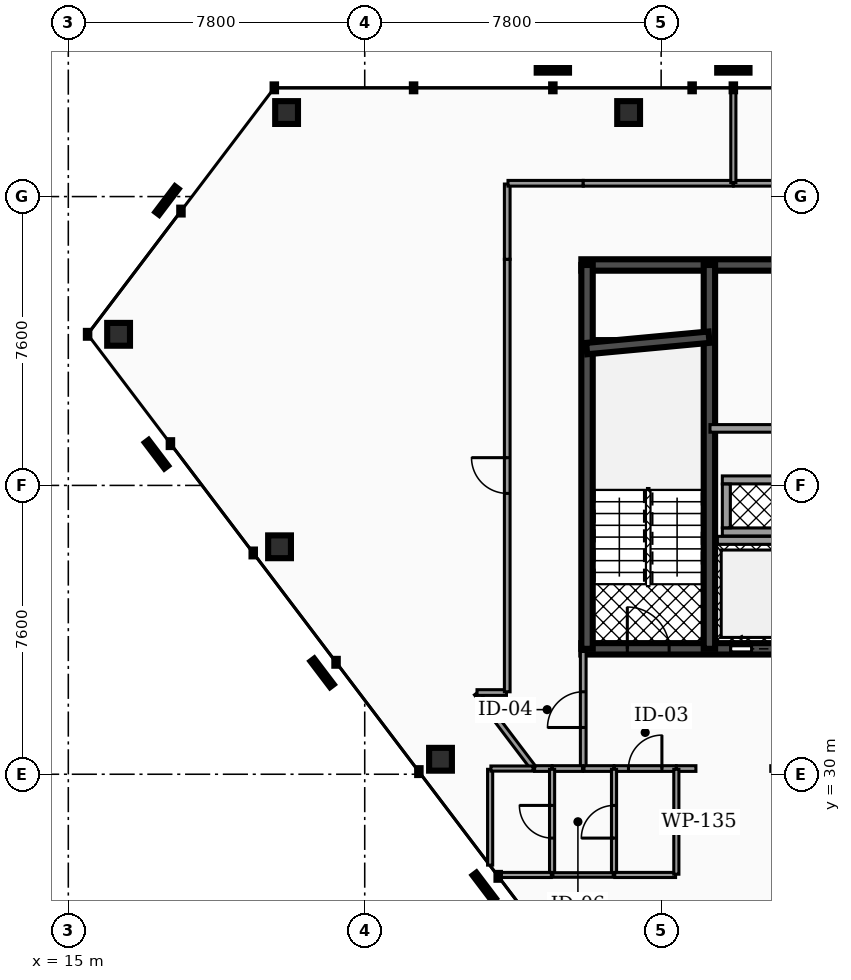
"""IFC4 building model, lengths in metres.
Left out: names, types, materials, properties, quantities, classifications, styles, units other than length and angle.
Written with IfcOpenShell. Run it as: python <this file> out.ifc"""

import sys

from ifc_helpers import new_model, si_unit, direction, frame, frame_2d, origin, origin_2d, place, context, subcontext, project, spatial, rectangle, hollow_rectangle, extrude, element, fill, save


model = new_model("IFC4")
c1 = context("Model", 3, precision=1e-05, world=origin(), true_north=direction((0.0, 1.0)))
c2 = subcontext(c1, "Body", "Model", "MODEL_VIEW")
j1 = project(units=[si_unit("LENGTHUNIT", "METRE"), si_unit("PLANEANGLEUNIT", "RADIAN")], contexts=[c1])
p1 = place(None, origin())
s1 = spatial("IfcSite", under=j1, at=p1, CompositionType="ELEMENT")
p2 = place(p1, origin())
s2 = spatial("IfcBuilding", under=s1, at=p2, CompositionType="ELEMENT")
p3 = place(p2, frame((0.0, 0.0, 239.36)))
s3 = spatial("IfcBuildingStorey", under=s2, at=p3, CompositionType="ELEMENT", Elevation=239.36)
p4 = place(p3, frame((28.5, 43.4, 0.0), z_axis=(0.0, 0.0, 1.0), x_axis=(1.0, 0.0, 0.0)))
e1 = element("IfcWall", 1, at=p4, inside=s3, PredefinedType="SHEAR", context=c2, shape_type="SweptSolid", body=[
    extrude(rectangle(XDim=19.86, YDim=0.3, at=frame_2d((9.93, 0.0))), origin(), (0.0, 0.0, 1.0), 3.18),
])
p5 = place(p3, frame((28.5, 33.3, 0.0), z_axis=(0.0, 0.0, 1.0), x_axis=(1.0, 0.0, 0.0)))
e2 = element("IfcWall", 2, at=p5, inside=s3, PredefinedType="SHEAR", context=c2, shape_type="SweptSolid", body=[
    extrude(rectangle(XDim=19.86, YDim=0.3, at=frame_2d((9.93, 0.0))), origin(), (0.0, 0.0, 1.0), 3.18),
])
p6 = place(p5, frame((3.93, 0.0, 0.0)))
e3 = element("IfcOpeningElement", 3, at=p6, cuts=e2, PredefinedType="OPENING", context=c2, shape_type="SweptSolid", body=[
    extrude(rectangle(XDim=1.1, YDim=2.15, at=frame_2d((0.55, 1.075))), frame((0.0, 0.16, 0.0), z_axis=(0.0, -1.0, 0.0), x_axis=(1.0, 0.0, 0.0)), (0.0, 0.0, 1.0), 0.32),
])
p7 = place(p5, frame((14.77, 0.0, 0.0)))
e4 = element("IfcOpeningElement", 4, at=p7, cuts=e2, PredefinedType="OPENING", context=c2, shape_type="SweptSolid", body=[
    extrude(rectangle(XDim=1.1, YDim=2.15, at=frame_2d((0.55, 1.075))), frame((0.0, 0.16, 0.0), z_axis=(0.0, -1.0, 0.0), x_axis=(1.0, 0.0, 0.0)), (0.0, 0.0, 1.0), 0.32),
])
p8 = place(p5, frame((11.25, 0.0, 0.0)))
e5 = element("IfcOpeningElement", 5, at=p8, cuts=e2, PredefinedType="OPENING", context=c2, shape_type="SweptSolid", body=[
    extrude(rectangle(XDim=1.0, YDim=2.1, at=frame_2d((0.5, 1.05))), frame((0.0, 0.16, 0.0), z_axis=(0.0, -1.0, 0.0), x_axis=(1.0, 0.0, 0.0)), (0.0, 0.0, 1.0), 0.32),
])
p9 = place(p5, frame((12.95, 0.0, 0.0)))
e6 = element("IfcOpeningElement", 6, at=p9, cuts=e2, PredefinedType="OPENING", context=c2, shape_type="SweptSolid", body=[
    extrude(rectangle(XDim=1.0, YDim=2.1, at=frame_2d((0.5, 1.05))), frame((0.0, 0.16, 0.0), z_axis=(0.0, -1.0, 0.0), x_axis=(1.0, 0.0, 0.0)), (0.0, 0.0, 1.0), 0.32),
])
p10 = place(p5, frame((5.85, 0.0, 0.0)))
e7 = element("IfcOpeningElement", 7, at=p10, cuts=e2, PredefinedType="OPENING", context=c2, shape_type="SweptSolid", body=[
    extrude(rectangle(XDim=1.0, YDim=2.1, at=frame_2d((0.5, 1.05))), frame((0.0, 0.16, 0.0), z_axis=(0.0, -1.0, 0.0), x_axis=(1.0, 0.0, 0.0)), (0.0, 0.0, 1.0), 0.32),
])
p11 = place(p5, frame((1.21, 0.0, 0.0)))
e8 = element("IfcOpeningElement", 8, at=p11, cuts=e2, PredefinedType="OPENING", context=c2, shape_type="SweptSolid", body=[
    extrude(rectangle(XDim=1.1, YDim=2.2, at=frame_2d((0.55, 1.1))), frame((0.0, 0.16, 0.0), z_axis=(0.0, -1.0, 0.0), x_axis=(1.0, 0.0, 0.0)), (0.0, 0.0, 1.0), 0.32),
])
p12 = place(p5, frame((9.34, 0.0, 0.0)))
e9 = element("IfcOpeningElement", 9, at=p12, cuts=e2, PredefinedType="OPENING", context=c2, shape_type="SweptSolid", body=[
    extrude(rectangle(XDim=1.12, YDim=2.05, at=frame_2d((0.56, 1.025))), frame((0.0, 0.16, 0.0), z_axis=(0.0, -1.0, 0.0), x_axis=(1.0, 0.0, 0.0)), (0.0, 0.0, 1.0), 0.32),
])
p13 = place(p5, frame((17.55, 0.0, 0.0)))
e10 = element("IfcOpeningElement", 10, at=p13, cuts=e2, PredefinedType="OPENING", context=c2, shape_type="SweptSolid", body=[
    extrude(rectangle(XDim=1.1, YDim=2.2, at=frame_2d((0.55, 1.1))), frame((0.0, 0.16, 0.0), z_axis=(0.0, -1.0, 0.0), x_axis=(1.0, 0.0, 0.0)), (0.0, 0.0, 1.0), 0.32),
])
for number, where, z_axis, x_axis in (
    (11, (28.65, 33.3, 0.0), (0.0, 0.0, 1.0), (0.0, 1.0, 0.0)),
    (12, (31.87, 33.3, 0.0), (0.0, 0.0, 1.0), (0.0, 1.0, 0.0)),
):
    element("IfcWall", number, at=place(p3, frame(where, z_axis=z_axis, x_axis=x_axis)), inside=s3, PredefinedType="SHEAR", context=c2, shape_type="SweptSolid", body=[
        extrude(rectangle(XDim=10.1, YDim=0.3, at=frame_2d((5.05, 0.0))), origin(), (0.0, 0.0, 1.0), 3.18),
    ])
p14 = place(p3, frame((28.64, 41.2, 0.0), z_axis=(0.0, 0.0, 1.0), x_axis=(0.995687118776, 0.092774789157, 0.0)))
e13 = element("IfcWall", 13, at=p14, inside=s3, PredefinedType="SHEAR", context=c2, shape_type="SweptSolid", body=[
    extrude(rectangle(XDim=3.234, YDim=0.3, at=frame_2d((1.617, 0.0))), origin(), (0.0, 0.0, 1.0), 3.18),
])
for number, where, z_axis, x_axis in (
    (14, (29.744, 47.411, 0.0), (0.0, 0.0, 1.0), (1.0, 0.0, 0.0)),
    (15, (20.744, 47.411, 0.0), (0.0, 0.0, 1.0), (1.0, 0.0, 0.0)),
    (16, (16.323, 41.576, 0.0), (0.0, 0.0, 1.0), (1.0, 0.0, 0.0)),
    (17, (20.559, 35.985, 0.0), (0.0, 0.0, 1.0), (1.0, 0.0, 0.0)),
    (18, (24.794, 30.394, 0.0), (0.0, 0.0, 1.0), (1.0, 0.0, 0.0)),
):
    element("IfcColumn", number, at=place(p3, frame(where, z_axis=z_axis, x_axis=x_axis)), inside=s3, PredefinedType="COLUMN", context=c2, shape_type="SweptSolid", body=[
        extrude(hollow_rectangle(XDim=0.6, YDim=0.6, WallThickness=0.03, at=origin_2d()), origin(), (0.0, 0.0, 1.0), 3.18),
    ])
p15 = place(p3, frame((32.08, 36.155, 0.0), z_axis=(0.0, 0.0, 1.0), x_axis=(1.0, 0.0, 0.0)))
e19 = element("IfcWall", 19, at=p15, inside=s3, PredefinedType="SOLIDWALL", context=c2, shape_type="SweptSolid", body=[
    extrude(rectangle(XDim=1.8, YDim=0.21, at=frame_2d((0.9, 0.0))), origin(), (0.0, 0.0, 1.0), 3.18),
])
for number, where, z_axis, x_axis in (
    (20, (32.21, 36.375, 0.0), (0.0, 0.0, 1.0), (1.0, 0.0, 0.0)),
    (21, (32.21, 37.745, 0.0), (0.0, 0.0, 1.0), (1.0, 0.0, 0.0)),
):
    element("IfcWall", number, at=place(p3, frame(where, z_axis=z_axis, x_axis=x_axis)), inside=s3, PredefinedType="SOLIDWALL", context=c2, shape_type="SweptSolid", body=[
        extrude(rectangle(XDim=1.6, YDim=0.21, at=frame_2d((0.8, 0.0))), origin(), (0.0, 0.0, 1.0), 3.18),
    ])
p16 = place(p3, frame((32.315, 36.485, 0.0), z_axis=(0.0, 0.0, 1.0), x_axis=(0.0, 1.0, 0.0)))
e22 = element("IfcWall", 22, at=p16, inside=s3, PredefinedType="SOLIDWALL", context=c2, shape_type="SweptSolid", body=[
    extrude(rectangle(XDim=1.15, YDim=0.21, at=frame_2d((0.575, 0.0))), origin(), (0.0, 0.0, 1.0), 3.18),
])
p17 = place(p3, frame((31.885, 39.1, 0.0), z_axis=(0.0, 0.0, 1.0), x_axis=(1.0, 0.0, 0.0)))
e23 = element("IfcWall", 23, at=p17, inside=s3, PredefinedType="PARTITIONING", context=c2, shape_type="SweptSolid", body=[
    extrude(rectangle(XDim=5.645, YDim=0.2, at=frame_2d((2.823, 0.0))), origin(), (0.0, 0.0, 1.0), 2.235),
])
p18 = place(p3, frame((28.55, 30.17, 0.0), z_axis=(0.0, 0.0, 1.0), x_axis=(0.0, 1.0, 0.0)))
e24 = element("IfcWall", 24, at=p18, inside=s3, PredefinedType="PARTITIONING", context=c2, shape_type="SweptSolid", body=[
    extrude(rectangle(XDim=3.06, YDim=0.15, at=frame_2d((1.53, 0.0))), origin(), (0.0, 0.0, 1.0), 2.235),
])
p19 = place(p18, frame((1.06, 0.0, 0.0)))
e25 = element("IfcOpeningElement", 25, at=p19, cuts=e24, PredefinedType="OPENING", context=c2, shape_type="SweptSolid", body=[
    extrude(rectangle(XDim=0.94, YDim=2.05, at=frame_2d((0.47, 1.025))), frame((0.0, 0.085, 0.0), z_axis=(0.0, -1.0, 0.0), x_axis=(1.0, 0.0, 0.0)), (0.0, 0.0, 1.0), 0.17),
])
p20 = place(p3, frame((29.365, 30.15, 0.0), z_axis=(0.0, 0.0, 1.0), x_axis=(1.0, 0.0, 0.0)))
e26 = element("IfcWall", 26, at=p20, inside=s3, PredefinedType="PARTITIONING", context=c2, shape_type="SweptSolid", body=[
    extrude(rectangle(XDim=1.63, YDim=0.15, at=frame_2d((0.815, 0.0))), origin(), (0.0, 0.0, 1.0), 2.235),
])
p21 = place(p20, frame((0.375, 0.0, 0.0)))
e27 = element("IfcOpeningElement", 27, at=p21, cuts=e26, PredefinedType="OPENING", context=c2, shape_type="SweptSolid", body=[
    extrude(rectangle(XDim=0.88, YDim=2.05, at=frame_2d((0.44, 1.025))), frame((0.0, 0.085, 0.0), z_axis=(0.0, -1.0, 0.0), x_axis=(1.0, 0.0, 0.0)), (0.0, 0.0, 1.0), 0.17),
])
p22 = place(p3, frame((28.57, 30.15, 0.0), z_axis=(0.0, 0.0, 1.0), x_axis=(1.0, 0.0, 0.0)))
e28 = element("IfcWall", 28, at=p22, inside=s3, PredefinedType="PARTITIONING", context=c2, shape_type="SweptSolid", body=[
    extrude(rectangle(XDim=0.785, YDim=0.15, at=frame_2d((0.393, 0.0))), origin(), (0.0, 0.0, 1.0), 2.235),
])
p23 = place(p3, frame((33.485, 30.15, 0.0), z_axis=(0.0, 0.0, 1.0), x_axis=(1.0, 0.0, 0.0)))
e29 = element("IfcWall", 29, at=p23, inside=s3, PredefinedType="PARTITIONING", context=c2, shape_type="SweptSolid", body=[
    extrude(rectangle(XDim=9.83, YDim=0.15, at=frame_2d((4.915, 0.0))), origin(), (0.0, 0.0, 1.0), 2.235),
])
p24 = place(p23, frame((0.445, 0.0, 0.0)))
e30 = element("IfcOpeningElement", 30, at=p24, cuts=e29, PredefinedType="OPENING", context=c2, shape_type="SweptSolid", body=[
    extrude(rectangle(XDim=0.94, YDim=2.05, at=frame_2d((0.47, 1.025))), frame((0.0, 0.085, 0.0), z_axis=(0.0, -1.0, 0.0), x_axis=(1.0, 0.0, 0.0)), (0.0, 0.0, 1.0), 0.17),
])
p25 = place(p3, frame((31.005, 30.15, 0.0), z_axis=(0.0, 0.0, 1.0), x_axis=(1.0, 0.0, 0.0)))
e31 = element("IfcWall", 31, at=p25, inside=s3, PredefinedType="PARTITIONING", context=c2, shape_type="SweptSolid", body=[
    extrude(rectangle(XDim=0.51, YDim=0.15, at=frame_2d((0.255, 0.0))), origin(), (0.0, 0.0, 1.0), 2.235),
])
p26 = place(p3, frame((27.27, 30.15, 0.0), z_axis=(0.0, 0.0, 1.0), x_axis=(1.0, 0.0, 0.0)))
e32 = element("IfcWall", 32, at=p26, inside=s3, PredefinedType="PARTITIONING", context=c2, shape_type="SweptSolid", body=[
    extrude(rectangle(XDim=0.455, YDim=0.15, at=frame_2d((0.228, 0.0))), origin(), (0.0, 0.0, 1.0), 2.235),
])
p27 = place(p3, frame((27.735, 30.15, 0.0), z_axis=(0.0, 0.0, 1.0), x_axis=(1.0, 0.0, 0.0)))
e33 = element("IfcWall", 33, at=p27, inside=s3, PredefinedType="PARTITIONING", context=c2, shape_type="SweptSolid", body=[
    extrude(rectangle(XDim=0.795, YDim=0.15, at=frame_2d((0.397, 0.0))), origin(), (0.0, 0.0, 1.0), 2.235),
])
p28 = place(p3, frame((25.747, 32.134, 0.0), z_axis=(0.0, 0.0, 1.0), x_axis=(0.603931928578, -0.797035899847, 0.0)))
e34 = element("IfcWall", 34, at=p28, inside=s3, PredefinedType="PARTITIONING", context=c2, shape_type="SweptSolid", body=[
    extrude(rectangle(XDim=2.469, YDim=0.15, at=frame_2d((1.235, 0.0))), origin(), (0.0, 0.0, 1.0), 2.235),
])
p29 = place(p3, frame((25.755, 32.15, 0.0), z_axis=(0.0, 0.0, 1.0), x_axis=(1.0, 0.0, 0.0)))
e35 = element("IfcWall", 35, at=p29, inside=s3, PredefinedType="PARTITIONING", context=c2, shape_type="SweptSolid", body=[
    extrude(rectangle(XDim=0.775, YDim=0.15, at=frame_2d((0.388, 0.0))), origin(), (0.0, 0.0, 1.0), 2.235),
])
p30 = place(p3, frame((26.55, 32.17, 0.0), z_axis=(0.0, 0.0, 1.0), x_axis=(0.0, 1.0, 0.0)))
e36 = element("IfcWall", 36, at=p30, inside=s3, PredefinedType="PARTITIONING", context=c2, shape_type="SweptSolid", body=[
    extrude(rectangle(XDim=11.38, YDim=0.15, at=frame_2d((5.69, 0.0))), origin(), (0.0, 0.0, 1.0), 2.235),
])
p31 = place(p30, frame((5.22, 0.0, 0.0)))
e37 = element("IfcOpeningElement", 37, at=p31, cuts=e36, PredefinedType="OPENING", context=c2, shape_type="SweptSolid", body=[
    extrude(rectangle(XDim=0.94, YDim=2.05, at=frame_2d((0.47, 1.025))), frame((0.0, 0.085, 0.0), z_axis=(0.0, -1.0, 0.0), x_axis=(1.0, 0.0, 0.0)), (0.0, 0.0, 1.0), 0.17),
])
for number, where, z_axis, x_axis in (
    (38, (26.55, 43.55, 0.0), (0.0, 0.0, 1.0), (0.0, 1.0, 0.0)),
    (39, (26.57, 45.55, 0.0), (0.0, 0.0, 1.0), (1.0, 0.0, 0.0)),
):
    element("IfcWall", number, at=place(p3, frame(where, z_axis=z_axis, x_axis=x_axis)), inside=s3, PredefinedType="PARTITIONING", context=c2, shape_type="SweptSolid", body=[
        extrude(rectangle(XDim=1.98, YDim=0.15, at=frame_2d((0.99, 0.0))), origin(), (0.0, 0.0, 1.0), 2.235),
    ])
p32 = place(p3, frame((28.55, 45.55, 0.0), z_axis=(0.0, 0.0, 1.0), x_axis=(1.0, 0.0, 0.0)))
e40 = element("IfcWall", 40, at=p32, inside=s3, PredefinedType="PARTITIONING", context=c2, shape_type="SweptSolid", body=[
    extrude(rectangle(XDim=3.945, YDim=0.15, at=frame_2d((1.973, 0.0))), origin(), (0.0, 0.0, 1.0), 2.235),
])
p33 = place(p3, frame((32.505, 45.55, 0.0), z_axis=(0.0, 0.0, 1.0), x_axis=(1.0, 0.0, 0.0)))
e41 = element("IfcWall", 41, at=p33, inside=s3, PredefinedType="PARTITIONING", context=c2, shape_type="SweptSolid", body=[
    extrude(rectangle(XDim=2.114, YDim=0.15, at=frame_2d((1.057, 0.0))), origin(), (0.0, 0.0, 1.0), 2.235),
])
p34 = place(p3, frame((29.36, 27.37, 0.0), z_axis=(0.0, 0.0, 1.0), x_axis=(0.0, 1.0, 0.0)))
e42 = element("IfcWall", 42, at=p34, inside=s3, PredefinedType="PARTITIONING", context=c2, shape_type="SweptSolid", body=[
    extrude(rectangle(XDim=2.76, YDim=0.135, at=frame_2d((1.38, 0.0))), origin(), (0.0, 0.0, 1.0), 2.235),
])
p35 = place(p34, frame((0.95, 0.0, 0.0)))
e43 = element("IfcOpeningElement", 43, at=p35, cuts=e42, PredefinedType="OPENING", context=c2, shape_type="SweptSolid", body=[
    extrude(rectangle(XDim=0.86, YDim=2.05, at=frame_2d((0.43, 1.025))), frame((0.0, 0.077, 0.0), z_axis=(0.0, -1.0, 0.0), x_axis=(1.0, 0.0, 0.0)), (0.0, 0.0, 1.0), 0.155),
])
p36 = place(p3, frame((29.38, 27.35, 0.0), z_axis=(0.0, 0.0, 1.0), x_axis=(1.0, 0.0, 0.0)))
e44 = element("IfcWall", 44, at=p36, inside=s3, PredefinedType="PARTITIONING", context=c2, shape_type="SweptSolid", body=[
    extrude(rectangle(XDim=1.6, YDim=0.135, at=frame_2d((0.8, 0.0))), origin(), (0.0, 0.0, 1.0), 2.235),
])
p37 = place(p3, frame((31.0, 27.37, 0.0), z_axis=(0.0, 0.0, 1.0), x_axis=(0.0, 1.0, 0.0)))
e45 = element("IfcWall", 45, at=p37, inside=s3, PredefinedType="PARTITIONING", context=c2, shape_type="SweptSolid", body=[
    extrude(rectangle(XDim=2.76, YDim=0.135, at=frame_2d((1.38, 0.0))), origin(), (0.0, 0.0, 1.0), 2.235),
])
p38 = place(p3, frame((27.73, 27.37, 0.0), z_axis=(0.0, 0.0, 1.0), x_axis=(0.0, 1.0, 0.0)))
e46 = element("IfcWall", 46, at=p38, inside=s3, PredefinedType="PARTITIONING", context=c2, shape_type="SweptSolid", body=[
    extrude(rectangle(XDim=2.76, YDim=0.135, at=frame_2d((1.38, 0.0))), origin(), (0.0, 0.0, 1.0), 2.235),
])
p39 = place(p38, frame((0.95, 0.0, 0.0)))
e47 = element("IfcOpeningElement", 47, at=p39, cuts=e46, PredefinedType="OPENING", context=c2, shape_type="SweptSolid", body=[
    extrude(rectangle(XDim=0.86, YDim=2.05, at=frame_2d((0.43, 1.025))), frame((0.0, 0.077, 0.0), z_axis=(0.0, -1.0, 0.0), x_axis=(1.0, 0.0, 0.0)), (0.0, 0.0, 1.0), 0.155),
])
p40 = place(p3, frame((26.3, 27.35, 0.0), z_axis=(0.0, 0.0, 1.0), x_axis=(1.0, 0.0, 0.0)))
e48 = element("IfcWall", 48, at=p40, inside=s3, PredefinedType="PARTITIONING", context=c2, shape_type="SweptSolid", body=[
    extrude(rectangle(XDim=1.41, YDim=0.135, at=frame_2d((0.705, 0.0))), origin(), (0.0, 0.0, 1.0), 2.235),
])
p41 = place(p3, frame((26.1, 27.609, 0.0), z_axis=(0.0, 0.0, 1.0), x_axis=(0.0, 1.0, 0.0)))
e49 = element("IfcWall", 49, at=p41, inside=s3, PredefinedType="PARTITIONING", context=c2, shape_type="SweptSolid", body=[
    extrude(rectangle(XDim=2.521, YDim=0.135, at=frame_2d((1.26, 0.0))), origin(), (0.0, 0.0, 1.0), 2.235),
])
p42 = place(p3, frame((26.12, 30.15, 0.0), z_axis=(0.0, 0.0, 1.0), x_axis=(1.0, 0.0, 0.0)))
e50 = element("IfcWall", 50, at=p42, inside=s3, PredefinedType="PARTITIONING", context=c2, shape_type="SweptSolid", body=[
    extrude(rectangle(XDim=1.11, YDim=0.135, at=frame_2d((0.555, 0.0))), origin(), (0.0, 0.0, 1.0), 2.235),
])
p43 = place(p3, frame((27.75, 27.35, 0.0), z_axis=(0.0, 0.0, 1.0), x_axis=(1.0, 0.0, 0.0)))
e51 = element("IfcWall", 51, at=p43, inside=s3, PredefinedType="PARTITIONING", context=c2, shape_type="SweptSolid", body=[
    extrude(rectangle(XDim=1.59, YDim=0.12, at=frame_2d((0.795, 0.0))), origin(), (0.0, 0.0, 1.0), 2.235),
])
p44 = place(p3, frame((32.5, 45.57, 0.0), z_axis=(0.0, 0.0, 1.0), x_axis=(0.0, 1.0, 0.0)))
e52 = element("IfcWall", 52, at=p44, inside=s3, PredefinedType="PARTITIONING", context=c2, shape_type="SweptSolid", body=[
    extrude(rectangle(XDim=2.476, YDim=0.135, at=frame_2d((1.238, 0.0))), origin(), (0.0, 0.0, 1.0), 2.235),
])
p45 = place(p6, origin())
e53 = element("IfcDoor", 53, at=p45, inside=s3, OperationType="SLIDING_TO_LEFT", PredefinedType="DOOR", context=c2, shape_type="SweptSolid", body=[
    extrude(rectangle(XDim=1.1, YDim=2.15, at=frame_2d((0.55, 1.075))), frame((0.0, 0.025, 0.0), z_axis=(0.0, -1.0, 0.0), x_axis=(1.0, 0.0, 0.0)), (0.0, 0.0, 1.0), 0.05),
])
fill(e3, e53)
p46 = place(p11, origin())
e54 = element("IfcDoor", 54, at=p46, inside=s3, OperationType="SINGLE_SWING_LEFT", PredefinedType="DOOR", context=c2, shape_type="SweptSolid", body=[
    extrude(rectangle(XDim=1.1, YDim=2.2, at=frame_2d((0.55, 1.1))), frame((0.0, 0.025, 0.0), z_axis=(0.0, -1.0, 0.0), x_axis=(1.0, 0.0, 0.0)), (0.0, 0.0, 1.0), 0.05),
])
fill(e8, e54)
p47 = place(p19, origin())
e55 = element("IfcDoor", 55, at=p47, inside=s3, OperationType="SINGLE_SWING_LEFT", PredefinedType="DOOR", context=c2, shape_type="SweptSolid", body=[
    extrude(rectangle(XDim=0.94, YDim=2.05, at=frame_2d((0.47, 1.025))), frame((0.0, 0.025, 0.0), z_axis=(0.0, -1.0, 0.0), x_axis=(1.0, 0.0, 0.0)), (0.0, 0.0, 1.0), 0.05),
])
fill(e25, e55)
p48 = place(p21, origin())
e56 = element("IfcDoor", 56, at=p48, inside=s3, OperationType="SINGLE_SWING_RIGHT", PredefinedType="DOOR", context=c2, shape_type="SweptSolid", body=[
    extrude(rectangle(XDim=0.88, YDim=2.05, at=frame_2d((0.44, 1.025))), frame((0.0, 0.025, 0.0), z_axis=(0.0, -1.0, 0.0), x_axis=(1.0, 0.0, 0.0)), (0.0, 0.0, 1.0), 0.05),
])
fill(e27, e56)
p49 = place(p31, origin())
e57 = element("IfcDoor", 57, at=p49, inside=s3, OperationType="SINGLE_SWING_RIGHT", PredefinedType="DOOR", context=c2, shape_type="SweptSolid", body=[
    extrude(rectangle(XDim=0.94, YDim=2.05, at=frame_2d((0.47, 1.025))), frame((0.0, 0.025, 0.0), z_axis=(0.0, -1.0, 0.0), x_axis=(1.0, 0.0, 0.0)), (0.0, 0.0, 1.0), 0.05),
])
fill(e37, e57)
p50 = place(p35, origin())
e58 = element("IfcDoor", 58, at=p50, inside=s3, OperationType="SINGLE_SWING_LEFT", PredefinedType="DOOR", context=c2, shape_type="SweptSolid", body=[
    extrude(rectangle(XDim=0.86, YDim=2.05, at=frame_2d((0.43, 1.025))), frame((0.0, 0.025, 0.0), z_axis=(0.0, -1.0, 0.0), x_axis=(1.0, 0.0, 0.0)), (0.0, 0.0, 1.0), 0.05),
])
fill(e43, e58)
p51 = place(p39, origin())
e59 = element("IfcDoor", 59, at=p51, inside=s3, OperationType="SINGLE_SWING_RIGHT", PredefinedType="DOOR", context=c2, shape_type="SweptSolid", body=[
    extrude(rectangle(XDim=0.86, YDim=2.05, at=frame_2d((0.43, 1.025))), frame((0.0, 0.025, 0.0), z_axis=(0.0, -1.0, 0.0), x_axis=(1.0, 0.0, 0.0)), (0.0, 0.0, 1.0), 0.05),
])
fill(e47, e59)
save(model, sys.argv[1])
